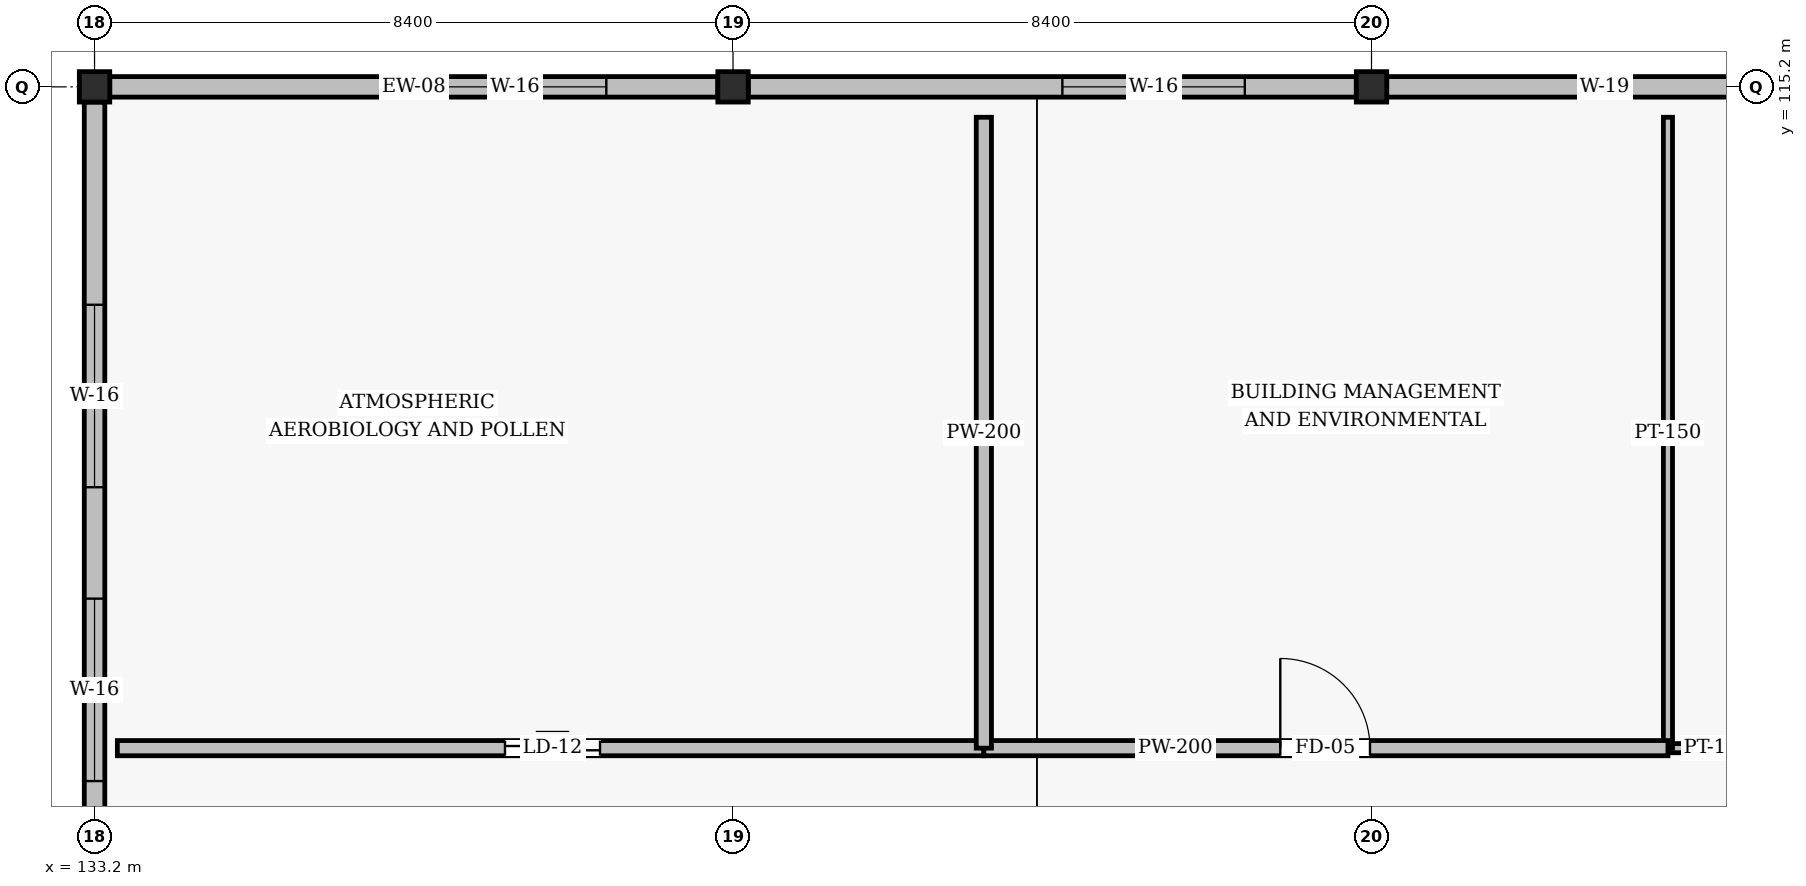
"""IFC4 building model, lengths in metres.
Left out: names, types, materials, properties, quantities, classifications, styles, units other than length and angle.
Written with IfcOpenShell. Run it as: python <this file> out.ifc"""

import sys

from ifc_helpers import new_model, si_unit, direction, frame, frame_2d, origin, origin_2d, place, context, subcontext, project, spatial, rectangle, hollow_rectangle, extrude, element, fill, save


model = new_model("IFC4")
c1 = context("Model", 3, precision=1e-05, world=origin(), true_north=direction((0.0, 1.0)))
c2 = subcontext(c1, "Body", "Model", "MODEL_VIEW")
j1 = project(units=[si_unit("LENGTHUNIT", "METRE"), si_unit("PLANEANGLEUNIT", "RADIAN")], contexts=[c1])
p1 = place(None, origin())
s1 = spatial("IfcSite", under=j1, at=p1, CompositionType="ELEMENT")
p2 = place(p1, origin())
s2 = spatial("IfcBuilding", under=s1, at=p2, CompositionType="ELEMENT")
p3 = place(p2, frame((0.0, 0.0, 61.2)))
s3 = spatial("IfcBuildingStorey", under=s2, at=p3, CompositionType="ELEMENT", Elevation=61.2)
for number, where, z_axis, x_axis in (
    (1, (133.2, 115.2, 0.0), (0.0, 0.0, 1.0), (1.0, 0.0, 0.0)),
    (2, (141.6, 115.2, 0.0), (0.0, 0.0, 1.0), (1.0, 0.0, 0.0)),
    (3, (150.0, 115.2, 0.0), (0.0, 0.0, 1.0), (1.0, 0.0, 0.0)),
):
    element("IfcColumn", number, at=place(p3, frame(where, z_axis=z_axis, x_axis=x_axis)), inside=s3, PredefinedType="COLUMN", context=c2, shape_type="SweptSolid", body=[
        extrude(hollow_rectangle(XDim=0.4, YDim=0.4, WallThickness=0.016, InnerFilletRadius=0.016, OuterFilletRadius=0.032, at=origin_2d()), origin(), (0.0, 0.0, 1.0), 4.2),
    ])
p4 = place(p3, frame((158.8, 115.2, 0.0), z_axis=(0.0, 0.0, 1.0), x_axis=(-1.0, 0.0, 0.0)))
e4 = element("IfcWall", 4, at=p4, inside=s3, PredefinedType="SOLIDWALL", context=c2, shape_type="SweptSolid", body=[
    extrude(rectangle(XDim=8.6, YDim=0.27, at=frame_2d((4.3, 0.0))), origin(), (0.0, 0.0, 1.0), 3.51),
])
p5 = place(p4, frame((2.542, 0.0, 1.35)))
e5 = element("IfcOpeningElement", 5, at=p5, cuts=e4, PredefinedType="OPENING", context=c2, shape_type="SweptSolid", body=[
    extrude(rectangle(XDim=0.65, YDim=1.2, at=frame_2d((0.325, 0.6))), frame((0.0, 0.145, 0.0), z_axis=(0.0, -1.0, 0.0), x_axis=(1.0, 0.0, 0.0)), (0.0, 0.0, 1.0), 0.29),
])
p6 = place(p4, frame((5.408, 0.0, 1.35)))
e6 = element("IfcOpeningElement", 6, at=p6, cuts=e4, PredefinedType="OPENING", context=c2, shape_type="SweptSolid", body=[
    extrude(rectangle(XDim=0.65, YDim=1.2, at=frame_2d((0.325, 0.6))), frame((0.0, 0.145, 0.0), z_axis=(0.0, -1.0, 0.0), x_axis=(1.0, 0.0, 0.0)), (0.0, 0.0, 1.0), 0.29),
])
p7 = place(p3, frame((149.8, 115.2, 0.0), z_axis=(0.0, 0.0, 1.0), x_axis=(-1.0, 0.0, 0.0)))
e7 = element("IfcWall", 7, at=p7, inside=s3, PredefinedType="SOLIDWALL", context=c2, shape_type="SweptSolid", body=[
    extrude(rectangle(XDim=8.0, YDim=0.27, at=frame_2d((4.0, 0.0))), origin(), (0.0, 0.0, 1.0), 3.51),
])
p8 = place(p7, frame((1.467, 0.0, 1.4)))
e8 = element("IfcOpeningElement", 8, at=p8, cuts=e7, PredefinedType="OPENING", context=c2, shape_type="SweptSolid", body=[
    extrude(rectangle(XDim=2.4, YDim=1.2, at=frame_2d((1.2, 0.6))), frame((0.0, 0.145, 0.0), z_axis=(0.0, -1.0, 0.0), x_axis=(1.0, 0.0, 0.0)), (0.0, 0.0, 1.0), 0.29),
])
p9 = place(p3, frame((141.4, 115.2, 0.0), z_axis=(0.0, 0.0, 1.0), x_axis=(-1.0, 0.0, 0.0)))
e9 = element("IfcWall", 9, at=p9, inside=s3, PredefinedType="SOLIDWALL", context=c2, shape_type="SweptSolid", body=[
    extrude(rectangle(XDim=8.0, YDim=0.27, at=frame_2d((4.0, 0.0))), origin(), (0.0, 0.0, 1.0), 3.51),
])
p10 = place(p9, frame((1.467, 0.0, 1.4)))
e10 = element("IfcOpeningElement", 10, at=p10, cuts=e9, PredefinedType="OPENING", context=c2, shape_type="SweptSolid", body=[
    extrude(rectangle(XDim=2.4, YDim=1.2, at=frame_2d((1.2, 0.6))), frame((0.0, 0.145, 0.0), z_axis=(0.0, -1.0, 0.0), x_axis=(1.0, 0.0, 0.0)), (0.0, 0.0, 1.0), 0.29),
])
p11 = place(p3, frame((133.2, 115.0, 0.0), z_axis=(0.0, 0.0, 1.0), x_axis=(0.0, -1.0, 0.0)))
e11 = element("IfcWall", 11, at=p11, inside=s3, PredefinedType="SOLIDWALL", context=c2, shape_type="SweptSolid", body=[
    extrude(rectangle(XDim=11.6, YDim=0.27, at=frame_2d((5.8, 0.0))), origin(), (0.0, 0.0, 1.0), 3.51),
])
p12 = place(p11, frame((2.667, 0.0, 1.4)))
e12 = element("IfcOpeningElement", 12, at=p12, cuts=e11, PredefinedType="OPENING", context=c2, shape_type="SweptSolid", body=[
    extrude(rectangle(XDim=2.4, YDim=1.2, at=frame_2d((1.2, 0.6))), frame((0.0, 0.145, 0.0), z_axis=(0.0, -1.0, 0.0), x_axis=(1.0, 0.0, 0.0)), (0.0, 0.0, 1.0), 0.29),
])
p13 = place(p11, frame((6.533, 0.0, 1.4)))
e13 = element("IfcOpeningElement", 13, at=p13, cuts=e11, PredefinedType="OPENING", context=c2, shape_type="SweptSolid", body=[
    extrude(rectangle(XDim=2.4, YDim=1.2, at=frame_2d((1.2, 0.6))), frame((0.0, 0.145, 0.0), z_axis=(0.0, -1.0, 0.0), x_axis=(1.0, 0.0, 0.0)), (0.0, 0.0, 1.0), 0.29),
])
p14 = place(p3, frame((153.9, 106.5, 0.0), z_axis=(0.0, 0.0, 1.0), x_axis=(1.0, 0.0, 0.0)))
e14 = element("IfcWall", 14, at=p14, inside=s3, PredefinedType="PARTITIONING", context=c2, shape_type="SweptSolid", body=[
    extrude(rectangle(XDim=3.6, YDim=0.12, at=frame_2d((1.8, 0.0))), origin(), (0.0, 0.0, 1.0), 3.96),
])
p15 = place(p14, frame((1.35, 0.0, 0.0)))
e15 = element("IfcOpeningElement", 15, at=p15, cuts=e14, PredefinedType="OPENING", context=c2, shape_type="SweptSolid", body=[
    extrude(rectangle(XDim=0.9, YDim=2.1, at=frame_2d((0.45, 1.05))), frame((0.0, 0.07, 0.0), z_axis=(0.0, -1.0, 0.0), x_axis=(1.0, 0.0, 0.0)), (0.0, 0.0, 1.0), 0.14),
])
p16 = place(p3, frame((153.9, 106.5, 0.0), z_axis=(0.0, 0.0, 1.0), x_axis=(0.0, 1.0, 0.0)))
e16 = element("IfcWall", 16, at=p16, inside=s3, PredefinedType="PARTITIONING", context=c2, shape_type="SweptSolid", body=[
    extrude(rectangle(XDim=8.3, YDim=0.12, at=frame_2d((4.15, 0.0))), origin(), (0.0, 0.0, 1.0), 3.96),
])
p17 = place(p3, frame((133.5, 106.5, 0.0), z_axis=(0.0, 0.0, 1.0), x_axis=(1.0, 0.0, 0.0)))
e17 = element("IfcWall", 17, at=p17, inside=s3, PredefinedType="SOLIDWALL", context=c2, shape_type="SweptSolid", body=[
    extrude(rectangle(XDim=11.4, YDim=0.2, at=frame_2d((5.7, 0.0))), origin(), (0.0, 0.0, 1.0), 3.51),
])
p18 = place(p17, frame((5.1, 0.0, 0.0)))
e18 = element("IfcOpeningElement", 18, at=p18, cuts=e17, PredefinedType="OPENING", context=c2, shape_type="SweptSolid", body=[
    extrude(rectangle(XDim=1.25, YDim=2.12, at=frame_2d((0.625, 1.06))), frame((0.0, 0.11, 0.0), z_axis=(0.0, -1.0, 0.0), x_axis=(1.0, 0.0, 0.0)), (0.0, 0.0, 1.0), 0.22),
])
p19 = place(p3, frame((144.9, 106.5, 0.0), z_axis=(0.0, 0.0, 1.0), x_axis=(1.0, 0.0, 0.0)))
e19 = element("IfcWall", 19, at=p19, inside=s3, PredefinedType="SOLIDWALL", context=c2, shape_type="SweptSolid", body=[
    extrude(rectangle(XDim=9.0, YDim=0.2, at=frame_2d((4.5, 0.0))), origin(), (0.0, 0.0, 1.0), 3.51),
])
p20 = place(p19, frame((3.9, 0.0, 0.0)))
e20 = element("IfcOpeningElement", 20, at=p20, cuts=e19, PredefinedType="OPENING", context=c2, shape_type="SweptSolid", body=[
    extrude(rectangle(XDim=1.18, YDim=2.15, at=frame_2d((0.59, 1.075))), frame((0.0, 0.11, 0.0), z_axis=(0.0, -1.0, 0.0), x_axis=(1.0, 0.0, 0.0)), (0.0, 0.0, 1.0), 0.22),
])
p21 = place(p3, frame((144.9, 106.5, 0.0), z_axis=(0.0, 0.0, 1.0), x_axis=(0.0, 1.0, 0.0)))
e21 = element("IfcWall", 21, at=p21, inside=s3, PredefinedType="SOLIDWALL", context=c2, shape_type="SweptSolid", body=[
    extrude(rectangle(XDim=8.3, YDim=0.2, at=frame_2d((4.15, 0.0))), origin(), (0.0, 0.0, 1.0), 3.96),
])
p22 = place(p6, origin())
e22 = element("IfcWindow", 22, at=p22, inside=s3, PartitioningType="SINGLE_PANEL", PredefinedType="WINDOW", context=c2, shape_type="SweptSolid", body=[
    extrude(rectangle(XDim=0.65, YDim=1.2, at=frame_2d((0.325, 0.6))), frame((0.0, 0.03, 0.0), z_axis=(0.0, -1.0, 0.0), x_axis=(1.0, 0.0, 0.0)), (0.0, 0.0, 1.0), 0.06),
])
fill(e6, e22)
p23 = place(p8, origin())
e23 = element("IfcWindow", 23, at=p23, inside=s3, PartitioningType="SINGLE_PANEL", PredefinedType="LIGHTDOME", context=c2, shape_type="SweptSolid", body=[
    extrude(rectangle(XDim=2.4, YDim=1.2, at=frame_2d((1.2, 0.6))), frame((0.0, 0.03, 0.0), z_axis=(0.0, -1.0, 0.0), x_axis=(1.0, 0.0, 0.0)), (0.0, 0.0, 1.0), 0.06),
])
fill(e8, e23)
p24 = place(p10, origin())
e24 = element("IfcWindow", 24, at=p24, inside=s3, PartitioningType="SINGLE_PANEL", PredefinedType="LIGHTDOME", context=c2, shape_type="SweptSolid", body=[
    extrude(rectangle(XDim=2.4, YDim=1.2, at=frame_2d((1.2, 0.6))), frame((0.0, 0.03, 0.0), z_axis=(0.0, -1.0, 0.0), x_axis=(1.0, 0.0, 0.0)), (0.0, 0.0, 1.0), 0.06),
])
fill(e10, e24)
p25 = place(p12, origin())
e25 = element("IfcWindow", 25, at=p25, inside=s3, PartitioningType="SINGLE_PANEL", PredefinedType="LIGHTDOME", context=c2, shape_type="SweptSolid", body=[
    extrude(rectangle(XDim=2.4, YDim=1.2, at=frame_2d((1.2, 0.6))), frame((0.0, 0.03, 0.0), z_axis=(0.0, -1.0, 0.0), x_axis=(1.0, 0.0, 0.0)), (0.0, 0.0, 1.0), 0.06),
])
fill(e12, e25)
p26 = place(p13, origin())
e26 = element("IfcWindow", 26, at=p26, inside=s3, PartitioningType="SINGLE_PANEL", PredefinedType="LIGHTDOME", context=c2, shape_type="SweptSolid", body=[
    extrude(rectangle(XDim=2.4, YDim=1.2, at=frame_2d((1.2, 0.6))), frame((0.0, 0.03, 0.0), z_axis=(0.0, -1.0, 0.0), x_axis=(1.0, 0.0, 0.0)), (0.0, 0.0, 1.0), 0.06),
])
fill(e13, e26)
p27 = place(p18, origin())
e27 = element("IfcDoor", 27, at=p27, inside=s3, OperationType="SINGLE_SWING_LEFT", PredefinedType="DOOR", context=c2, shape_type="SweptSolid", body=[
    extrude(rectangle(XDim=1.25, YDim=2.12, at=frame_2d((0.625, 1.06))), frame((0.0, 0.025, 0.0), z_axis=(0.0, -1.0, 0.0), x_axis=(1.0, 0.0, 0.0)), (0.0, 0.0, 1.0), 0.05),
])
fill(e18, e27)
p28 = place(p20, origin())
e28 = element("IfcDoor", 28, at=p28, inside=s3, OperationType="SINGLE_SWING_LEFT", PredefinedType="DOOR", context=c2, shape_type="SweptSolid", body=[
    extrude(rectangle(XDim=1.18, YDim=2.15, at=frame_2d((0.59, 1.075))), frame((0.0, 0.025, 0.0), z_axis=(0.0, -1.0, 0.0), x_axis=(1.0, 0.0, 0.0)), (0.0, 0.0, 1.0), 0.05),
])
fill(e20, e28)
save(model, sys.argv[1])
